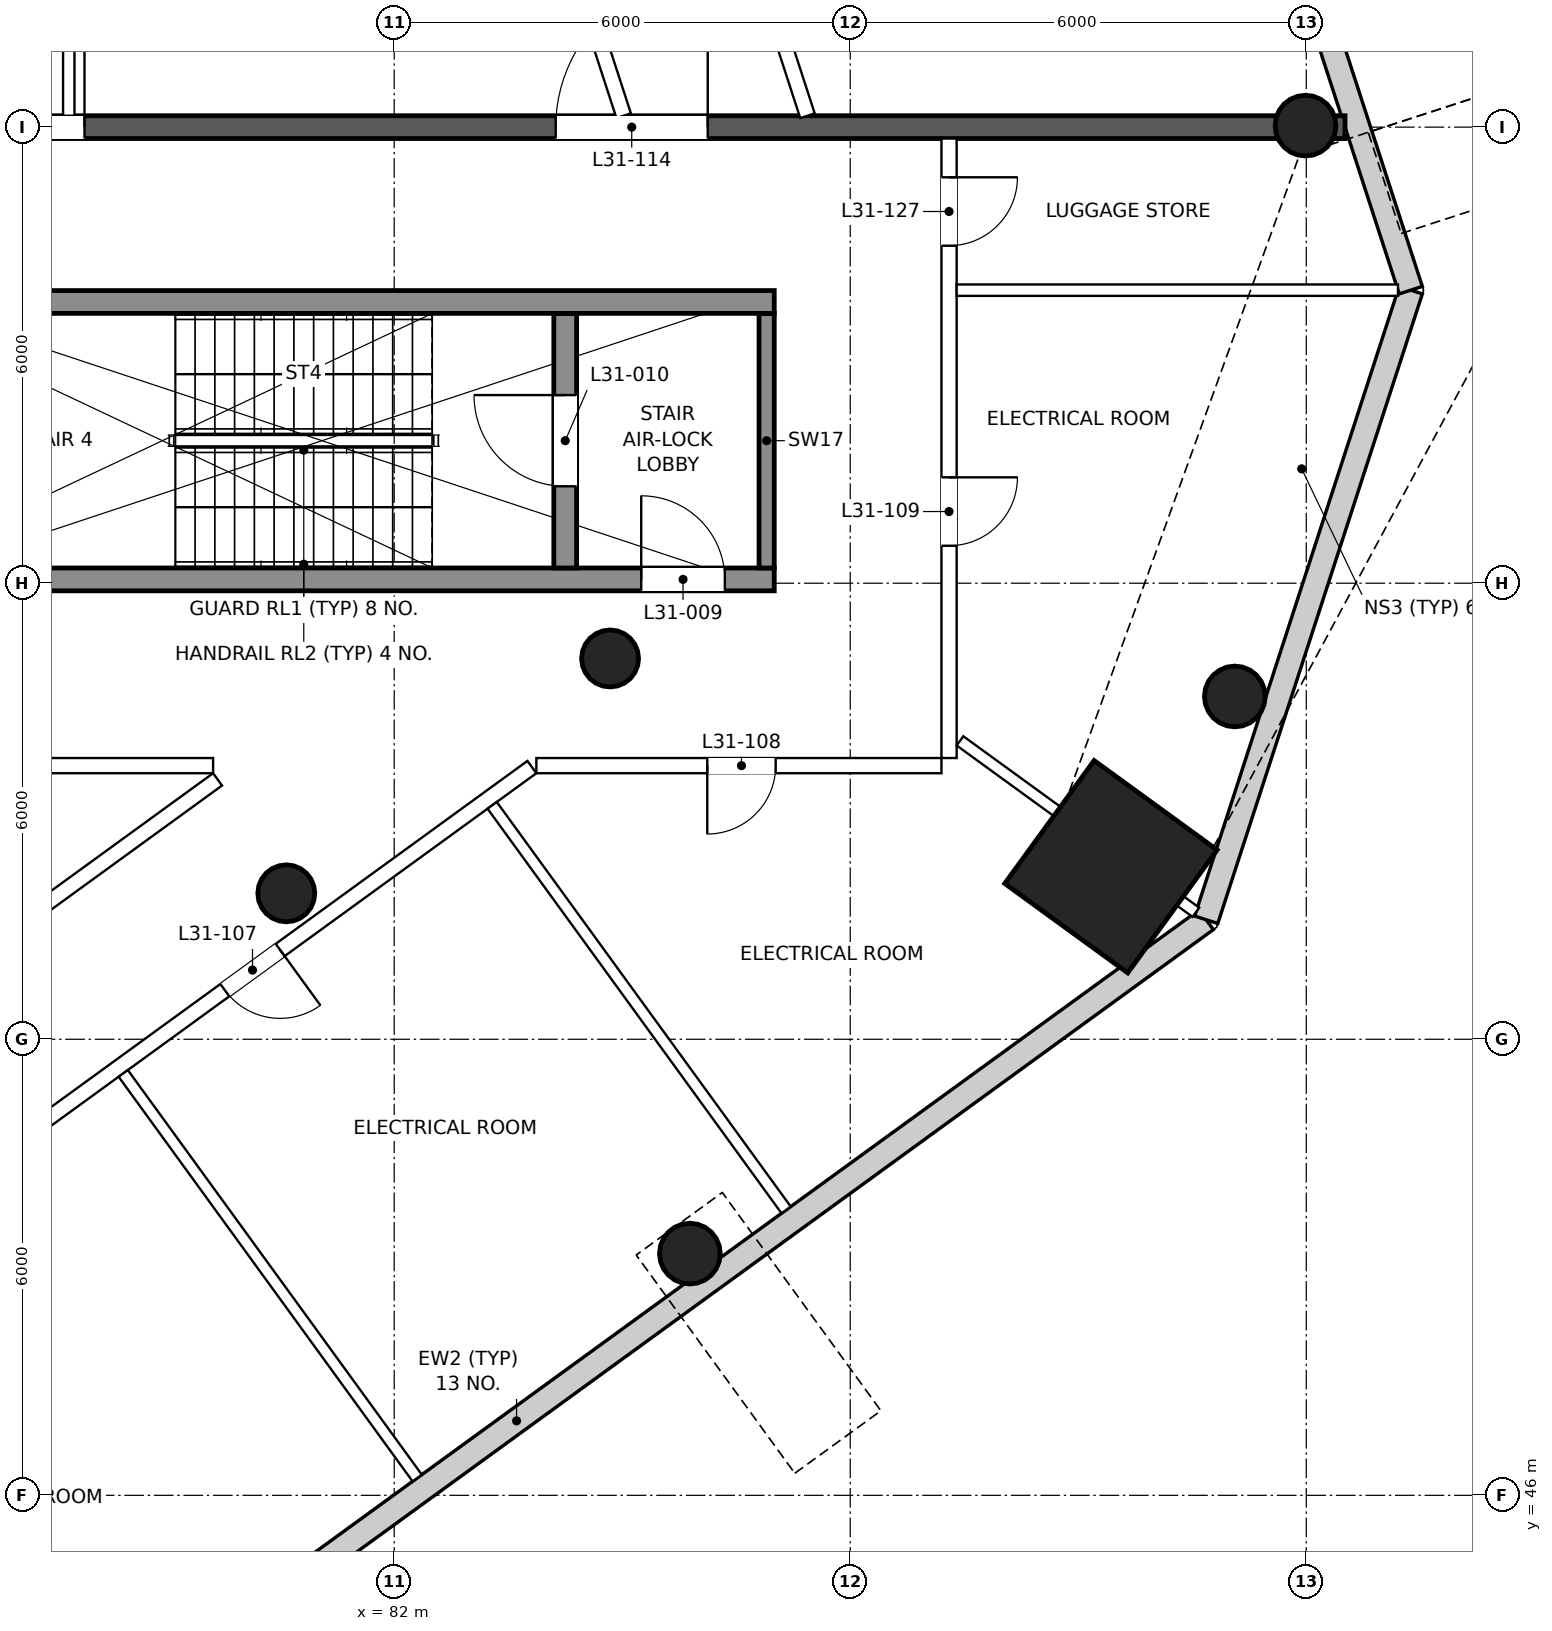
"""IFC4 building model, lengths in metres.
Left out: names, types, materials, properties, quantities, classifications, styles, units other than length and angle.
Written with IfcOpenShell. Run it as: python <this file> out.ifc"""

import sys

from ifc_helpers import new_model, si_unit, direction, frame, frame_2d, origin, origin_2d, place, context, subcontext, project, spatial, rectangle, circle, extrude, element, fill, save


model = new_model("IFC4")
c1 = context("Model", 3, precision=1e-05, world=origin(), true_north=direction((0.0, 1.0)))
c2 = subcontext(c1, "Body", "Model", "MODEL_VIEW")
j1 = project(units=[si_unit("LENGTHUNIT", "METRE"), si_unit("PLANEANGLEUNIT", "RADIAN")], contexts=[c1])
p1 = place(None, origin())
s1 = spatial("IfcSite", under=j1, at=p1, CompositionType="ELEMENT")
p2 = place(p1, origin())
s2 = spatial("IfcBuilding", under=s1, at=p2, CompositionType="ELEMENT")
p3 = place(p2, frame((0.0, 0.0, 137.6)))
s3 = spatial("IfcBuildingStorey", under=s2, at=p3, CompositionType="ELEMENT", Elevation=137.6)
p4 = place(p3, frame((85.89, 49.18, 0.0), z_axis=(0.0, 0.0, 1.0), x_axis=(1.0, 0.0, 0.0)))
e1 = element("IfcColumn", 1, at=p4, inside=s3, PredefinedType="COLUMN", context=c2, shape_type="SweptSolid", body=[
    extrude(circle(Radius=0.4, at=origin_2d()), origin(), (0.0, 0.0, 1.0), 5.0),
])
p5 = place(p3, frame((91.43, 54.27, 0.0), z_axis=(0.0, 0.0, 1.0), x_axis=(0.809016994375, -0.587785252292, 0.0)))
e2 = element("IfcColumn", 2, at=p5, inside=s3, PredefinedType="COLUMN", context=c2, shape_type="SweptSolid", body=[
    extrude(rectangle(XDim=2.0, YDim=2.0, at=origin_2d()), origin(), (0.0, 0.0, 1.0), 5.0),
])
for number, where, z_axis, x_axis in (
    (3, (93.06, 56.51, 0.0), (0.0, 0.0, 1.0), (1.0, 0.0, 0.0)),
    (4, (93.99, 64.02, 0.0), (0.0, 0.0, 1.0), (1.0, 0.0, 0.0)),
):
    element("IfcColumn", number, at=place(p3, frame(where, z_axis=z_axis, x_axis=x_axis)), inside=s3, PredefinedType="COLUMN", context=c2, shape_type="SweptSolid", body=[
        extrude(circle(Radius=0.4, at=origin_2d()), origin(), (0.0, 0.0, 1.0), 5.0),
    ])
for number, where, z_axis, x_axis in (
    (5, (80.58, 53.92, 0.0), (0.0, 0.0, 1.0), (1.0, 0.0, 0.0)),
    (6, (84.84, 57.01, 0.0), (0.0, 0.0, 1.0), (1.0, 0.0, 0.0)),
):
    element("IfcColumn", number, at=place(p3, frame(where, z_axis=z_axis, x_axis=x_axis)), inside=s3, PredefinedType="COLUMN", context=c2, shape_type="SweptSolid", body=[
        extrude(circle(Radius=0.375, at=origin_2d()), origin(), (0.0, 0.0, 1.0), 5.0),
    ])
p6 = place(p3, frame((74.536, 40.387, 0.0), z_axis=(0.0, 0.0, 1.0), x_axis=(0.80902026874, 0.58778074549, 0.0)))
e7 = element("IfcWall", 7, at=p6, inside=s3, PredefinedType="SOLIDWALL", context=c2, shape_type="SweptSolid", body=[
    extrude(rectangle(XDim=22.431, YDim=0.32, at=frame_2d((11.216, 0.0))), origin(), (0.0, 0.0, 1.0), 4.6),
])
p7 = place(p3, frame((92.684, 53.572, 0.0), z_axis=(0.0, 0.0, 1.0), x_axis=(0.309020152218, 0.951055490244, 0.0)))
e8 = element("IfcWall", 8, at=p7, inside=s3, PredefinedType="SOLIDWALL", context=c2, shape_type="SweptSolid", body=[
    extrude(rectangle(XDim=8.709, YDim=0.32, at=frame_2d((4.355, 0.0))), origin(), (0.0, 0.0, 1.0), 4.6),
])
p8 = place(p3, frame((95.375, 61.855, 0.0), z_axis=(0.0, 0.0, 1.0), x_axis=(-0.309023959084, 0.951054253296, 0.0)))
e9 = element("IfcWall", 9, at=p8, inside=s3, PredefinedType="SOLIDWALL", context=c2, shape_type="SweptSolid", body=[
    extrude(rectangle(XDim=21.775, YDim=0.32, at=frame_2d((10.887, 0.0))), origin(), (0.0, 0.0, 1.0), 4.6),
])
p9 = place(p3, frame((75.1, 58.05, 0.0), z_axis=(0.0, 0.0, 1.0), x_axis=(1.0, 0.0, 0.0)))
e10 = element("IfcWall", 10, at=p9, inside=s3, PredefinedType="SHEAR", context=c2, shape_type="SweptSolid", body=[
    extrude(rectangle(XDim=11.9, YDim=0.3, at=frame_2d((5.95, 0.0))), origin(), (0.0, 0.0, 1.0), 5.0),
])
p10 = place(p9, frame((10.15, 0.0, 0.0)))
e11 = element("IfcOpeningElement", 11, at=p10, cuts=e10, PredefinedType="OPENING", context=c2, shape_type="SweptSolid", body=[
    extrude(rectangle(XDim=1.1, YDim=2.1, at=frame_2d((0.55, 1.05))), frame((0.0, 0.16, 0.0), z_axis=(0.0, -1.0, 0.0), x_axis=(1.0, 0.0, 0.0)), (0.0, 0.0, 1.0), 0.32),
])
p11 = place(p3, frame((84.25, 58.2, 0.0), z_axis=(0.0, 0.0, 1.0), x_axis=(0.0, 1.0, 0.0)))
e12 = element("IfcWall", 12, at=p11, inside=s3, PredefinedType="SHEAR", context=c2, shape_type="SweptSolid", body=[
    extrude(rectangle(XDim=3.35, YDim=0.3, at=frame_2d((1.675, 0.0))), origin(), (0.0, 0.0, 1.0), 5.0),
])
p12 = place(p11, frame((1.075, 0.0, 0.0)))
e13 = element("IfcOpeningElement", 13, at=p12, cuts=e12, PredefinedType="OPENING", context=c2, shape_type="SweptSolid", body=[
    extrude(rectangle(XDim=1.2, YDim=2.1, at=frame_2d((0.6, 1.05))), frame((0.0, 0.16, 0.0), z_axis=(0.0, -1.0, 0.0), x_axis=(1.0, 0.0, 0.0)), (0.0, 0.0, 1.0), 0.32),
])
p13 = place(p3, frame((86.9, 58.2, 0.0), z_axis=(0.0, 0.0, 1.0), x_axis=(0.0, 1.0, 0.0)))
e14 = element("IfcWall", 14, at=p13, inside=s3, PredefinedType="SHEAR", context=c2, shape_type="SweptSolid", body=[
    extrude(rectangle(XDim=3.35, YDim=0.2, at=frame_2d((1.675, 0.0))), origin(), (0.0, 0.0, 1.0), 5.0),
])
p14 = place(p3, frame((75.1, 61.7, 0.0), z_axis=(0.0, 0.0, 1.0), x_axis=(1.0, 0.0, 0.0)))
e15 = element("IfcWall", 15, at=p14, inside=s3, PredefinedType="SHEAR", context=c2, shape_type="SweptSolid", body=[
    extrude(rectangle(XDim=11.9, YDim=0.3, at=frame_2d((5.95, 0.0))), origin(), (0.0, 0.0, 1.0), 5.0),
])
p15 = place(p3, frame((45.49, 64.0, 0.0), z_axis=(0.0, 0.0, 1.0), x_axis=(1.0, 0.0, 0.0)))
e16 = element("IfcWall", 16, at=p15, inside=s3, PredefinedType="PARTITIONING", context=c2, shape_type="SweptSolid", body=[
    extrude(rectangle(XDim=49.02, YDim=0.3, at=frame_2d((24.51, 0.0))), origin(), (0.0, 0.0, 1.0), 3.9),
])
p16 = place(p15, frame((8.385, 0.0, 0.0)))
e17 = element("IfcOpeningElement", 17, at=p16, cuts=e16, PredefinedType="OPENING", context=c2, shape_type="SweptSolid", body=[
    extrude(rectangle(XDim=2.0, YDim=2.1, at=frame_2d((1.0, 1.05))), frame((0.0, 0.16, 0.0), z_axis=(0.0, -1.0, 0.0), x_axis=(1.0, 0.0, 0.0)), (0.0, 0.0, 1.0), 0.32),
])
p17 = place(p15, frame((16.535, 0.0, 0.0)))
e18 = element("IfcOpeningElement", 18, at=p17, cuts=e16, PredefinedType="OPENING", context=c2, shape_type="SweptSolid", body=[
    extrude(rectangle(XDim=2.0, YDim=2.1, at=frame_2d((1.0, 1.05))), frame((0.0, 0.16, 0.0), z_axis=(0.0, -1.0, 0.0), x_axis=(1.0, 0.0, 0.0)), (0.0, 0.0, 1.0), 0.32),
])
p18 = place(p15, frame((23.91, 0.0, 0.0)))
e19 = element("IfcOpeningElement", 19, at=p18, cuts=e16, PredefinedType="OPENING", context=c2, shape_type="SweptSolid", body=[
    extrude(rectangle(XDim=1.2, YDim=2.1, at=frame_2d((0.6, 1.05))), frame((0.0, 0.16, 0.0), z_axis=(0.0, -1.0, 0.0), x_axis=(1.0, 0.0, 0.0)), (0.0, 0.0, 1.0), 0.32),
])
p19 = place(p15, frame((30.435, 0.0, 0.0)))
e20 = element("IfcOpeningElement", 20, at=p19, cuts=e16, PredefinedType="OPENING", context=c2, shape_type="SweptSolid", body=[
    extrude(rectangle(XDim=2.0, YDim=2.1, at=frame_2d((1.0, 1.05))), frame((0.0, 0.16, 0.0), z_axis=(0.0, -1.0, 0.0), x_axis=(1.0, 0.0, 0.0)), (0.0, 0.0, 1.0), 0.32),
])
p20 = place(p15, frame((38.635, 0.0, 0.0)))
e21 = element("IfcOpeningElement", 21, at=p20, cuts=e16, PredefinedType="OPENING", context=c2, shape_type="SweptSolid", body=[
    extrude(rectangle(XDim=2.0, YDim=2.1, at=frame_2d((1.0, 1.05))), frame((0.0, 0.16, 0.0), z_axis=(0.0, -1.0, 0.0), x_axis=(1.0, 0.0, 0.0)), (0.0, 0.0, 1.0), 0.32),
])
p21 = place(p3, frame((83.305, 76.868, 0.0), z_axis=(0.0, 0.0, 1.0), x_axis=(0.309005574406, -0.951060226792, 0.0)))
e22 = element("IfcWall", 22, at=p21, inside=s3, PredefinedType="PARTITIONING", context=c2, shape_type="SweptSolid", body=[
    extrude(rectangle(XDim=13.373, YDim=0.2, at=frame_2d((6.687, 0.0))), origin(), (0.0, 0.0, 1.0), 4.6),
])
p22 = place(p21, frame((1.841, 0.0, 0.0)))
e23 = element("IfcOpeningElement", 23, at=p22, cuts=e22, PredefinedType="OPENING", context=c2, shape_type="SweptSolid", body=[
    extrude(rectangle(XDim=0.9, YDim=2.1, at=frame_2d((0.45, 1.05))), frame((0.0, 0.11, 0.0), z_axis=(0.0, -1.0, 0.0), x_axis=(1.0, 0.0, 0.0)), (0.0, 0.0, 1.0), 0.22),
])
p23 = place(p21, frame((6.236, 0.0, 0.0)))
e24 = element("IfcOpeningElement", 24, at=p23, cuts=e22, PredefinedType="OPENING", context=c2, shape_type="SweptSolid", body=[
    extrude(rectangle(XDim=0.9, YDim=2.1, at=frame_2d((0.45, 1.05))), frame((0.0, 0.11, 0.0), z_axis=(0.0, -1.0, 0.0), x_axis=(1.0, 0.0, 0.0)), (0.0, 0.0, 1.0), 0.22),
])
p24 = place(p3, frame((89.3, 63.85, 0.0), z_axis=(0.0, 0.0, 1.0), x_axis=(0.0, -1.0, 0.0)))
e25 = element("IfcWall", 25, at=p24, inside=s3, PredefinedType="PARTITIONING", context=c2, shape_type="SweptSolid", body=[
    extrude(rectangle(XDim=8.15, YDim=0.2, at=frame_2d((4.075, 0.0))), origin(), (0.0, 0.0, 1.0), 4.15),
])
p25 = place(p24, frame((4.457, 0.0, 0.0)))
e26 = element("IfcOpeningElement", 26, at=p25, cuts=e25, PredefinedType="OPENING", context=c2, shape_type="SweptSolid", body=[
    extrude(rectangle(XDim=0.9, YDim=2.1, at=frame_2d((0.45, 1.05))), frame((0.0, 0.11, 0.0), z_axis=(0.0, -1.0, 0.0), x_axis=(1.0, 0.0, 0.0)), (0.0, 0.0, 1.0), 0.22),
])
p26 = place(p24, frame((0.51, 0.0, 0.0)))
e27 = element("IfcOpeningElement", 27, at=p26, cuts=e25, PredefinedType="OPENING", context=c2, shape_type="SweptSolid", body=[
    extrude(rectangle(XDim=0.9, YDim=2.1, at=frame_2d((0.45, 1.05))), frame((0.0, 0.11, 0.0), z_axis=(0.0, -1.0, 0.0), x_axis=(1.0, 0.0, 0.0)), (0.0, 0.0, 1.0), 0.22),
])
p27 = place(p3, frame((89.2, 55.6, 0.0), z_axis=(0.0, 0.0, 1.0), x_axis=(-1.0, 0.0, 0.0)))
e28 = element("IfcWall", 28, at=p27, inside=s3, PredefinedType="PARTITIONING", context=c2, shape_type="SweptSolid", body=[
    extrude(rectangle(XDim=5.33, YDim=0.2, at=frame_2d((2.665, 0.0))), origin(), (0.0, 0.0, 1.0), 4.15),
])
p28 = place(p27, frame((2.181, 0.0, 0.0)))
e29 = element("IfcOpeningElement", 29, at=p28, cuts=e28, PredefinedType="OPENING", context=c2, shape_type="SweptSolid", body=[
    extrude(rectangle(XDim=0.9, YDim=2.1, at=frame_2d((0.45, 1.05))), frame((0.0, 0.11, 0.0), z_axis=(0.0, -1.0, 0.0), x_axis=(1.0, 0.0, 0.0)), (0.0, 0.0, 1.0), 0.22),
])
p29 = place(p3, frame((83.812, 55.581, 0.0), z_axis=(0.0, 0.0, 1.0), x_axis=(-0.809019673584, -0.58778156466, 0.0)))
e30 = element("IfcWall", 30, at=p29, inside=s3, PredefinedType="PARTITIONING", context=c2, shape_type="SweptSolid", body=[
    extrude(rectangle(XDim=14.179, YDim=0.2, at=frame_2d((7.09, 0.0))), origin(), (0.0, 0.0, 1.0), 3.6),
])
p30 = place(p29, frame((10.015, 0.0, 0.0)))
e31 = element("IfcOpeningElement", 31, at=p30, cuts=e30, PredefinedType="OPENING", context=c2, shape_type="SweptSolid", body=[
    extrude(rectangle(XDim=0.9, YDim=2.1, at=frame_2d((0.45, 1.05))), frame((0.0, 0.11, 0.0), z_axis=(0.0, -1.0, 0.0), x_axis=(1.0, 0.0, 0.0)), (0.0, 0.0, 1.0), 0.22),
])
p31 = place(p29, frame((4.094, 0.0, 0.0)))
e32 = element("IfcOpeningElement", 32, at=p31, cuts=e30, PredefinedType="OPENING", context=c2, shape_type="SweptSolid", body=[
    extrude(rectangle(XDim=0.9, YDim=2.1, at=frame_2d((0.45, 1.05))), frame((0.0, 0.11, 0.0), z_axis=(0.0, -1.0, 0.0), x_axis=(1.0, 0.0, 0.0)), (0.0, 0.0, 1.0), 0.22),
])
p32 = place(p3, frame((85.019, 64.15, 0.0), z_axis=(0.0, 0.0, 1.0), x_axis=(-0.309036861841, 0.951050060735, 0.0)))
e33 = element("IfcWall", 33, at=p32, inside=s3, PredefinedType="PARTITIONING", context=c2, shape_type="SweptSolid", body=[
    extrude(rectangle(XDim=4.712, YDim=0.2, at=frame_2d((2.356, 0.0))), origin(), (0.0, 0.0, 1.0), 4.6),
])
p33 = place(p3, frame((71.309, 49.34, 0.0), z_axis=(0.0, 0.0, 1.0), x_axis=(0.809009574042, 0.587795465369, 0.0)))
e34 = element("IfcWall", 34, at=p33, inside=s3, PredefinedType="PARTITIONING", context=c2, shape_type="SweptSolid", body=[
    extrude(rectangle(XDim=10.342, YDim=0.2, at=frame_2d((5.171, 0.0))), origin(), (0.0, 0.0, 1.0), 4.05),
])
p34 = place(p33, frame((5.034, 0.0, 0.0)))
e35 = element("IfcOpeningElement", 35, at=p34, cuts=e34, PredefinedType="OPENING", context=c2, shape_type="SweptSolid", body=[
    extrude(rectangle(XDim=0.9, YDim=2.1, at=frame_2d((0.45, 1.05))), frame((0.0, 0.11, 0.0), z_axis=(0.0, -1.0, 0.0), x_axis=(1.0, 0.0, 0.0)), (0.0, 0.0, 1.0), 0.22),
])
p35 = place(p3, frame((79.617, 55.6, 0.0), z_axis=(0.0, 0.0, 1.0), x_axis=(-1.0, 0.0, 0.0)))
e36 = element("IfcWall", 36, at=p35, inside=s3, PredefinedType="PARTITIONING", context=c2, shape_type="SweptSolid", body=[
    extrude(rectangle(XDim=6.717, YDim=0.2, at=frame_2d((3.358, 0.0))), origin(), (0.0, 0.0, 1.0), 4.05),
])
p36 = place(p3, frame((92.547, 53.671, 0.0), z_axis=(0.0, 0.0, 1.0), x_axis=(-0.808989212511, 0.587823488848, 0.0)))
e37 = element("IfcWall", 37, at=p36, inside=s3, PredefinedType="PARTITIONING", context=c2, shape_type="SweptSolid", body=[
    extrude(rectangle(XDim=3.836, YDim=0.15, at=frame_2d((1.918, 0.0))), origin(), (0.0, 0.0, 1.0), 3.6),
])
p37 = place(p3, frame((95.207, 61.855, 0.0), z_axis=(0.0, 0.0, 1.0), x_axis=(-1.0, 0.0, 0.0)))
e38 = element("IfcWall", 38, at=p37, inside=s3, PredefinedType="PARTITIONING", context=c2, shape_type="SweptSolid", body=[
    extrude(rectangle(XDim=5.807, YDim=0.15, at=frame_2d((2.903, 0.0))), origin(), (0.0, 0.0, 1.0), 4.6),
])
p38 = place(p3, frame((82.302, 46.228, 0.0), z_axis=(0.0, 0.0, 1.0), x_axis=(-0.587796586364, 0.809008759569, 0.0)))
e39 = element("IfcWall", 39, at=p38, inside=s3, PredefinedType="PARTITIONING", context=c2, shape_type="SweptSolid", body=[
    extrude(rectangle(XDim=6.58, YDim=0.15, at=frame_2d((3.29, 0.0))), origin(), (0.0, 0.0, 1.0), 4.6),
])
p39 = place(p3, frame((87.156, 49.754, 0.0), z_axis=(0.0, 0.0, 1.0), x_axis=(-0.587796586364, 0.809008759569, 0.0)))
e40 = element("IfcWall", 40, at=p39, inside=s3, PredefinedType="PARTITIONING", context=c2, shape_type="SweptSolid", body=[
    extrude(rectangle(XDim=6.58, YDim=0.15, at=frame_2d((3.29, 0.0))), origin(), (0.0, 0.0, 1.0), 3.9),
])
p40 = place(p3, frame((77.718, 64.15, 0.0), z_axis=(0.0, 0.0, 1.0), x_axis=(0.0, 1.0, 0.0)))
e41 = element("IfcWall", 41, at=p40, inside=s3, PredefinedType="PARTITIONING", context=c2, shape_type="SweptSolid", body=[
    extrude(rectangle(XDim=4.45, YDim=0.15, at=frame_2d((2.225, 0.0))), origin(), (0.0, 0.0, 1.0), 4.6),
])
p41 = place(p10, origin())
e42 = element("IfcDoor", 42, at=p41, inside=s3, OperationType="SINGLE_SWING_LEFT", PredefinedType="DOOR", context=c2, shape_type="SweptSolid", body=[
    extrude(rectangle(XDim=1.1, YDim=2.1, at=frame_2d((0.55, 1.05))), frame((0.0, 0.025, 0.0), z_axis=(0.0, -1.0, 0.0), x_axis=(1.0, 0.0, 0.0)), (0.0, 0.0, 1.0), 0.05),
])
fill(e11, e42)
p42 = place(p12, origin())
e43 = element("IfcDoor", 43, at=p42, inside=s3, OperationType="SINGLE_SWING_RIGHT", PredefinedType="DOOR", context=c2, shape_type="SweptSolid", body=[
    extrude(rectangle(XDim=1.2, YDim=2.1, at=frame_2d((0.6, 1.05))), frame((0.0, 0.025, 0.0), z_axis=(0.0, -1.0, 0.0), x_axis=(1.0, 0.0, 0.0)), (0.0, 0.0, 1.0), 0.05),
])
fill(e13, e43)
p43 = place(p31, origin())
e44 = element("IfcDoor", 44, at=p43, inside=s3, OperationType="SINGLE_SWING_LEFT", PredefinedType="DOOR", context=c2, shape_type="SweptSolid", body=[
    extrude(rectangle(XDim=0.9, YDim=2.1, at=frame_2d((0.45, 1.05))), frame((0.0, 0.025, 0.0), z_axis=(0.0, -1.0, 0.0), x_axis=(1.0, 0.0, 0.0)), (0.0, 0.0, 1.0), 0.05),
])
fill(e32, e44)
p44 = place(p28, origin())
e45 = element("IfcDoor", 45, at=p44, inside=s3, OperationType="SINGLE_SWING_RIGHT", PredefinedType="DOOR", context=c2, shape_type="SweptSolid", body=[
    extrude(rectangle(XDim=0.9, YDim=2.1, at=frame_2d((0.45, 1.05))), frame((0.0, 0.025, 0.0), z_axis=(0.0, -1.0, 0.0), x_axis=(1.0, 0.0, 0.0)), (0.0, 0.0, 1.0), 0.05),
])
fill(e29, e45)
p45 = place(p25, origin())
e46 = element("IfcDoor", 46, at=p45, inside=s3, OperationType="SINGLE_SWING_LEFT", PredefinedType="DOOR", context=c2, shape_type="SweptSolid", body=[
    extrude(rectangle(XDim=0.9, YDim=2.1, at=frame_2d((0.45, 1.05))), frame((0.0, 0.025, 0.0), z_axis=(0.0, -1.0, 0.0), x_axis=(1.0, 0.0, 0.0)), (0.0, 0.0, 1.0), 0.05),
])
fill(e26, e46)
p46 = place(p19, origin())
e47 = element("IfcDoor", 47, at=p46, inside=s3, OperationType="DOUBLE_DOOR_SINGLE_SWING", PredefinedType="DOOR", context=c2, shape_type="SweptSolid", body=[
    extrude(rectangle(XDim=2.0, YDim=2.1, at=frame_2d((1.0, 1.05))), frame((0.0, 0.025, 0.0), z_axis=(0.0, -1.0, 0.0), x_axis=(1.0, 0.0, 0.0)), (0.0, 0.0, 1.0), 0.05),
])
fill(e20, e47)
p47 = place(p20, origin())
e48 = element("IfcDoor", 48, at=p47, inside=s3, OperationType="DOUBLE_DOOR_SINGLE_SWING", PredefinedType="DOOR", context=c2, shape_type="SweptSolid", body=[
    extrude(rectangle(XDim=2.0, YDim=2.1, at=frame_2d((1.0, 1.05))), frame((0.0, 0.025, 0.0), z_axis=(0.0, -1.0, 0.0), x_axis=(1.0, 0.0, 0.0)), (0.0, 0.0, 1.0), 0.05),
])
fill(e21, e48)
p48 = place(p26, origin())
e49 = element("IfcDoor", 49, at=p48, inside=s3, OperationType="SINGLE_SWING_LEFT", PredefinedType="DOOR", context=c2, shape_type="SweptSolid", body=[
    extrude(rectangle(XDim=0.9, YDim=2.1, at=frame_2d((0.45, 1.05))), frame((0.0, 0.025, 0.0), z_axis=(0.0, -1.0, 0.0), x_axis=(1.0, 0.0, 0.0)), (0.0, 0.0, 1.0), 0.05),
])
fill(e27, e49)
save(model, sys.argv[1])
